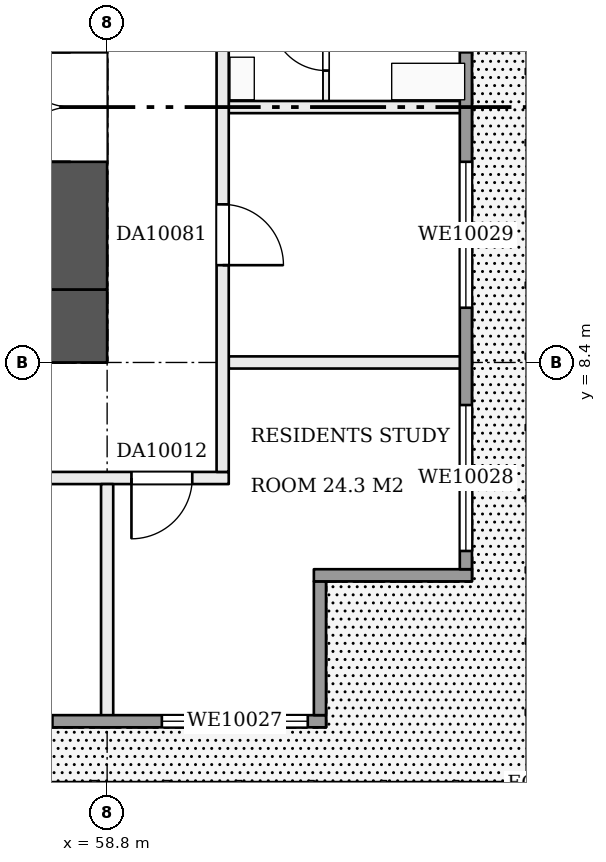
"""IFC4 building model, lengths in metres.
Left out: names, types, materials, properties, quantities, classifications, styles, units other than length and angle.
Written with IfcOpenShell. Run it as: python <this file> out.ifc"""

import sys

from ifc_helpers import new_model, si_unit, direction, frame, frame_2d, origin, place, context, subcontext, project, spatial, rectangle, extrude, element, fill, save


model = new_model("IFC4")
c1 = context("Model", 3, precision=1e-05, world=origin(), true_north=direction((0.0, 1.0)))
c2 = subcontext(c1, "Body", "Model", "MODEL_VIEW")
j1 = project(units=[si_unit("LENGTHUNIT", "METRE"), si_unit("PLANEANGLEUNIT", "RADIAN")], contexts=[c1])
p1 = place(None, origin())
s1 = spatial("IfcSite", under=j1, at=p1, CompositionType="ELEMENT")
p2 = place(p1, origin())
s2 = spatial("IfcBuilding", under=s1, at=p2, CompositionType="ELEMENT")
p3 = place(p2, frame((0.0, 0.0, 46.2)))
s3 = spatial("IfcBuildingStorey", under=s2, at=p3, CompositionType="ELEMENT", Elevation=46.2)
p4 = place(p3, frame((42.0, 9.0, 0.0), z_axis=(0.0, 0.0, 1.0), x_axis=(1.0, 0.0, 0.0)))
e1 = element("IfcWall", 1, at=p4, inside=s3, PredefinedType="SHEAR", context=c2, shape_type="SweptSolid", body=[
    extrude(rectangle(XDim=16.8, YDim=1.2, at=frame_2d((8.4, 0.0))), origin(), (0.0, 0.0, 1.0), 3.22),
])
p5 = place(p4, frame((3.1, 0.0, 0.0)))
e2 = element("IfcOpeningElement", 2, at=p5, cuts=e1, PredefinedType="OPENING", context=c2, shape_type="SweptSolid", body=[
    extrude(rectangle(XDim=1.0, YDim=2.1, at=frame_2d((0.5, 1.05))), frame((0.0, 0.61, 0.0), z_axis=(0.0, -1.0, 0.0), x_axis=(1.0, 0.0, 0.0)), (0.0, 0.0, 1.0), 1.22),
])
p6 = place(p4, frame((12.7, 0.0, 0.0)))
e3 = element("IfcOpeningElement", 3, at=p6, cuts=e1, PredefinedType="OPENING", context=c2, shape_type="SweptSolid", body=[
    extrude(rectangle(XDim=1.0, YDim=2.1, at=frame_2d((0.5, 1.05))), frame((0.0, 0.61, 0.0), z_axis=(0.0, -1.0, 0.0), x_axis=(1.0, 0.0, 0.0)), (0.0, 0.0, 1.0), 1.22),
])
p7 = place(p3, frame((58.2, 9.6, 0.0), z_axis=(0.0, 0.0, 1.0), x_axis=(0.0, 1.0, 0.0)))
e4 = element("IfcWall", 4, at=p7, inside=s3, PredefinedType="SHEAR", context=c2, shape_type="SweptSolid", body=[
    extrude(rectangle(XDim=14.4, YDim=1.2, at=frame_2d((7.2, 0.0))), origin(), (0.0, 0.0, 1.0), 3.22),
])
p8 = place(p7, frame((2.1, 0.0, 0.0)))
e5 = element("IfcOpeningElement", 5, at=p8, cuts=e4, PredefinedType="OPENING", context=c2, shape_type="SweptSolid", body=[
    extrude(rectangle(XDim=1.8, YDim=2.1, at=frame_2d((0.9, 1.05))), frame((0.0, 0.61, 0.0), z_axis=(0.0, -1.0, 0.0), x_axis=(1.0, 0.0, 0.0)), (0.0, 0.0, 1.0), 1.22),
])
p9 = place(p3, frame((42.1, 6.5, 0.0), z_axis=(0.0, 0.0, 1.0), x_axis=(1.0, 0.0, 0.0)))
e6 = element("IfcWall", 6, at=p9, inside=s3, PredefinedType="PARTITIONING", context=c2, shape_type="SweptSolid", body=[
    extrude(rectangle(XDim=18.7, YDim=0.2, at=frame_2d((9.35, 0.0))), origin(), (0.0, 0.0, 1.0), 3.22),
])
p10 = place(p9, frame((1.5, 0.0, 0.0)))
e7 = element("IfcOpeningElement", 7, at=p10, cuts=e6, PredefinedType="OPENING", context=c2, shape_type="SweptSolid", body=[
    extrude(rectangle(XDim=1.0, YDim=2.1, at=frame_2d((0.5, 1.05))), frame((0.0, 0.11, 0.0), z_axis=(0.0, -1.0, 0.0), x_axis=(1.0, 0.0, 0.0)), (0.0, 0.0, 1.0), 0.22),
])
p11 = place(p9, frame((6.7, 0.0, 0.0)))
e8 = element("IfcOpeningElement", 8, at=p11, cuts=e6, PredefinedType="OPENING", context=c2, shape_type="SweptSolid", body=[
    extrude(rectangle(XDim=1.0, YDim=2.1, at=frame_2d((0.5, 1.05))), frame((0.0, 0.11, 0.0), z_axis=(0.0, -1.0, 0.0), x_axis=(1.0, 0.0, 0.0)), (0.0, 0.0, 1.0), 0.22),
])
p12 = place(p9, frame((14.1, 0.0, 0.0)))
e9 = element("IfcOpeningElement", 9, at=p12, cuts=e6, PredefinedType="OPENING", context=c2, shape_type="SweptSolid", body=[
    extrude(rectangle(XDim=1.0, YDim=2.1, at=frame_2d((0.5, 1.05))), frame((0.0, 0.11, 0.0), z_axis=(0.0, -1.0, 0.0), x_axis=(1.0, 0.0, 0.0)), (0.0, 0.0, 1.0), 0.22),
])
p13 = place(p9, frame((17.1, 0.0, 0.0)))
e10 = element("IfcOpeningElement", 10, at=p13, cuts=e6, PredefinedType="OPENING", context=c2, shape_type="SweptSolid", body=[
    extrude(rectangle(XDim=1.0, YDim=2.1, at=frame_2d((0.5, 1.05))), frame((0.0, 0.11, 0.0), z_axis=(0.0, -1.0, 0.0), x_axis=(1.0, 0.0, 0.0)), (0.0, 0.0, 1.0), 0.22),
])
for number, where, z_axis, x_axis in (
    (11, (60.8, 8.4, 0.0), (0.0, 0.0, 1.0), (1.0, 0.0, 0.0)),
    (12, (60.8, 12.6, 0.0), (0.0, 0.0, 1.0), (1.0, 0.0, 0.0)),
    (13, (58.8, 2.5, 0.0), (0.0, 0.0, 1.0), (0.0, 1.0, 0.0)),
):
    element("IfcWall", number, at=place(p3, frame(where, z_axis=z_axis, x_axis=x_axis)), inside=s3, PredefinedType="PARTITIONING", context=c2, shape_type="SweptSolid", body=[
        extrude(rectangle(XDim=3.9, YDim=0.2, at=frame_2d((1.95, 0.0))), origin(), (0.0, 0.0, 1.0), 3.22),
    ])
p14 = place(p3, frame((60.7, 6.6, 0.0), z_axis=(0.0, 0.0, 1.0), x_axis=(0.0, 1.0, 0.0)))
e14 = element("IfcWall", 14, at=p14, inside=s3, PredefinedType="PARTITIONING", context=c2, shape_type="SweptSolid", body=[
    extrude(rectangle(XDim=14.6, YDim=0.2, at=frame_2d((7.3, 0.0))), origin(), (0.0, 0.0, 1.0), 3.22),
])
p15 = place(p14, frame((3.4, 0.0, 0.0)))
e15 = element("IfcOpeningElement", 15, at=p15, cuts=e14, PredefinedType="OPENING", context=c2, shape_type="SweptSolid", body=[
    extrude(rectangle(XDim=1.0, YDim=2.1, at=frame_2d((0.5, 1.05))), frame((0.0, 0.11, 0.0), z_axis=(0.0, -1.0, 0.0), x_axis=(1.0, 0.0, 0.0)), (0.0, 0.0, 1.0), 0.22),
])
p16 = place(p14, frame((8.7, 0.0, 0.0)))
e16 = element("IfcOpeningElement", 16, at=p16, cuts=e14, PredefinedType="OPENING", context=c2, shape_type="SweptSolid", body=[
    extrude(rectangle(XDim=1.0, YDim=2.1, at=frame_2d((0.5, 1.05))), frame((0.0, 0.11, 0.0), z_axis=(0.0, -1.0, 0.0), x_axis=(1.0, 0.0, 0.0)), (0.0, 0.0, 1.0), 0.22),
])
p17 = place(p3, frame((62.4, 12.7, 0.0), z_axis=(0.0, 0.0, 1.0), x_axis=(0.0, 1.0, 0.0)))
e17 = element("IfcWall", 17, at=p17, inside=s3, PredefinedType="PARTITIONING", context=c2, shape_type="SweptSolid", body=[
    extrude(rectangle(XDim=4.05, YDim=0.1, at=frame_2d((2.025, 0.0))), origin(), (0.0, 0.0, 1.0), 3.22),
])
p18 = place(p17, frame((2.6, 0.0, 0.0)))
e18 = element("IfcOpeningElement", 18, at=p18, cuts=e17, PredefinedType="OPENING", context=c2, shape_type="SweptSolid", body=[
    extrude(rectangle(XDim=0.9, YDim=2.1, at=frame_2d((0.45, 1.05))), frame((0.0, 0.06, 0.0), z_axis=(0.0, -1.0, 0.0), x_axis=(1.0, 0.0, 0.0)), (0.0, 0.0, 1.0), 0.12),
])
p19 = place(p17, frame((0.5, 0.0, 0.0)))
e19 = element("IfcOpeningElement", 19, at=p19, cuts=e17, PredefinedType="OPENING", context=c2, shape_type="SweptSolid", body=[
    extrude(rectangle(XDim=0.9, YDim=2.1, at=frame_2d((0.45, 1.05))), frame((0.0, 0.06, 0.0), z_axis=(0.0, -1.0, 0.0), x_axis=(1.0, 0.0, 0.0)), (0.0, 0.0, 1.0), 0.12),
])
p20 = place(p3, frame((4.8, 2.5, 0.0), z_axis=(0.0, 0.0, 1.0), x_axis=(1.0, 0.0, 0.0)))
e20 = element("IfcWall", 20, at=p20, inside=s3, PredefinedType="SOLIDWALL", context=c2, shape_type="SweptSolid", body=[
    extrude(rectangle(XDim=57.6, YDim=0.2, at=frame_2d((28.8, 0.0))), origin(), (0.0, 0.0, 1.0), 3.22),
])
p21 = place(p20, frame((0.3, 0.0, 0.0)))
e21 = element("IfcOpeningElement", 21, at=p21, cuts=e20, PredefinedType="OPENING", context=c2, shape_type="SweptSolid", body=[
    extrude(rectangle(XDim=2.4, YDim=2.2, at=frame_2d((1.2, 1.1))), frame((0.0, 0.11, 0.0), z_axis=(0.0, -1.0, 0.0), x_axis=(1.0, 0.0, 0.0)), (0.0, 0.0, 1.0), 0.22),
])
p22 = place(p20, frame((4.5, 0.0, 0.9)))
e22 = element("IfcOpeningElement", 22, at=p22, cuts=e20, PredefinedType="OPENING", context=c2, shape_type="SweptSolid", body=[
    extrude(rectangle(XDim=2.4, YDim=1.5, at=frame_2d((1.2, 0.75))), frame((0.0, 0.11, 0.0), z_axis=(0.0, -1.0, 0.0), x_axis=(1.0, 0.0, 0.0)), (0.0, 0.0, 1.0), 0.22),
])
p23 = place(p20, frame((8.7, 0.0, 0.9)))
e23 = element("IfcOpeningElement", 23, at=p23, cuts=e20, PredefinedType="OPENING", context=c2, shape_type="SweptSolid", body=[
    extrude(rectangle(XDim=2.4, YDim=1.5, at=frame_2d((1.2, 0.75))), frame((0.0, 0.11, 0.0), z_axis=(0.0, -1.0, 0.0), x_axis=(1.0, 0.0, 0.0)), (0.0, 0.0, 1.0), 0.22),
])
p24 = place(p20, frame((12.9, 0.0, 0.0)))
e24 = element("IfcOpeningElement", 24, at=p24, cuts=e20, PredefinedType="OPENING", context=c2, shape_type="SweptSolid", body=[
    extrude(rectangle(XDim=2.4, YDim=2.2, at=frame_2d((1.2, 1.1))), frame((0.0, 0.11, 0.0), z_axis=(0.0, -1.0, 0.0), x_axis=(1.0, 0.0, 0.0)), (0.0, 0.0, 1.0), 0.22),
])
p25 = place(p20, frame((17.1, 0.0, 0.9)))
e25 = element("IfcOpeningElement", 25, at=p25, cuts=e20, PredefinedType="OPENING", context=c2, shape_type="SweptSolid", body=[
    extrude(rectangle(XDim=2.4, YDim=1.5, at=frame_2d((1.2, 0.75))), frame((0.0, 0.11, 0.0), z_axis=(0.0, -1.0, 0.0), x_axis=(1.0, 0.0, 0.0)), (0.0, 0.0, 1.0), 0.22),
])
p26 = place(p20, frame((21.3, 0.0, 0.9)))
e26 = element("IfcOpeningElement", 26, at=p26, cuts=e20, PredefinedType="OPENING", context=c2, shape_type="SweptSolid", body=[
    extrude(rectangle(XDim=2.4, YDim=1.5, at=frame_2d((1.2, 0.75))), frame((0.0, 0.11, 0.0), z_axis=(0.0, -1.0, 0.0), x_axis=(1.0, 0.0, 0.0)), (0.0, 0.0, 1.0), 0.22),
])
p27 = place(p20, frame((25.5, 0.0, 0.0)))
e27 = element("IfcOpeningElement", 27, at=p27, cuts=e20, PredefinedType="OPENING", context=c2, shape_type="SweptSolid", body=[
    extrude(rectangle(XDim=2.4, YDim=2.2, at=frame_2d((1.2, 1.1))), frame((0.0, 0.11, 0.0), z_axis=(0.0, -1.0, 0.0), x_axis=(1.0, 0.0, 0.0)), (0.0, 0.0, 1.0), 0.22),
])
p28 = place(p20, frame((29.7, 0.0, 0.0)))
e28 = element("IfcOpeningElement", 28, at=p28, cuts=e20, PredefinedType="OPENING", context=c2, shape_type="SweptSolid", body=[
    extrude(rectangle(XDim=2.4, YDim=2.2, at=frame_2d((1.2, 1.1))), frame((0.0, 0.11, 0.0), z_axis=(0.0, -1.0, 0.0), x_axis=(1.0, 0.0, 0.0)), (0.0, 0.0, 1.0), 0.22),
])
p29 = place(p20, frame((33.9, 0.0, 0.0)))
e29 = element("IfcOpeningElement", 29, at=p29, cuts=e20, PredefinedType="OPENING", context=c2, shape_type="SweptSolid", body=[
    extrude(rectangle(XDim=2.4, YDim=2.2, at=frame_2d((1.2, 1.1))), frame((0.0, 0.11, 0.0), z_axis=(0.0, -1.0, 0.0), x_axis=(1.0, 0.0, 0.0)), (0.0, 0.0, 1.0), 0.22),
])
p30 = place(p20, frame((38.1, 0.0, 0.9)))
e30 = element("IfcOpeningElement", 30, at=p30, cuts=e20, PredefinedType="OPENING", context=c2, shape_type="SweptSolid", body=[
    extrude(rectangle(XDim=2.4, YDim=1.5, at=frame_2d((1.2, 0.75))), frame((0.0, 0.11, 0.0), z_axis=(0.0, -1.0, 0.0), x_axis=(1.0, 0.0, 0.0)), (0.0, 0.0, 1.0), 0.22),
])
p31 = place(p20, frame((42.3, 0.0, 0.9)))
e31 = element("IfcOpeningElement", 31, at=p31, cuts=e20, PredefinedType="OPENING", context=c2, shape_type="SweptSolid", body=[
    extrude(rectangle(XDim=2.4, YDim=1.5, at=frame_2d((1.2, 0.75))), frame((0.0, 0.11, 0.0), z_axis=(0.0, -1.0, 0.0), x_axis=(1.0, 0.0, 0.0)), (0.0, 0.0, 1.0), 0.22),
])
p32 = place(p20, frame((46.5, 0.0, 0.0)))
e32 = element("IfcOpeningElement", 32, at=p32, cuts=e20, PredefinedType="OPENING", context=c2, shape_type="SweptSolid", body=[
    extrude(rectangle(XDim=2.4, YDim=2.2, at=frame_2d((1.2, 1.1))), frame((0.0, 0.11, 0.0), z_axis=(0.0, -1.0, 0.0), x_axis=(1.0, 0.0, 0.0)), (0.0, 0.0, 1.0), 0.22),
])
p33 = place(p20, frame((50.7, 0.0, 0.9)))
e33 = element("IfcOpeningElement", 33, at=p33, cuts=e20, PredefinedType="OPENING", context=c2, shape_type="SweptSolid", body=[
    extrude(rectangle(XDim=2.4, YDim=1.5, at=frame_2d((1.2, 0.75))), frame((0.0, 0.11, 0.0), z_axis=(0.0, -1.0, 0.0), x_axis=(1.0, 0.0, 0.0)), (0.0, 0.0, 1.0), 0.22),
])
p34 = place(p20, frame((54.9, 0.0, 0.9)))
e34 = element("IfcOpeningElement", 34, at=p34, cuts=e20, PredefinedType="OPENING", context=c2, shape_type="SweptSolid", body=[
    extrude(rectangle(XDim=2.4, YDim=1.5, at=frame_2d((1.2, 0.75))), frame((0.0, 0.11, 0.0), z_axis=(0.0, -1.0, 0.0), x_axis=(1.0, 0.0, 0.0)), (0.0, 0.0, 1.0), 0.22),
])
p35 = place(p3, frame((62.3, 2.6, 0.0), z_axis=(0.0, 0.0, 1.0), x_axis=(0.0, 1.0, 0.0)))
e35 = element("IfcWall", 35, at=p35, inside=s3, PredefinedType="SOLIDWALL", context=c2, shape_type="SweptSolid", body=[
    extrude(rectangle(XDim=2.2, YDim=0.2, at=frame_2d((1.1, 0.0))), origin(), (0.0, 0.0, 1.0), 3.22),
])
p36 = place(p3, frame((62.2, 4.9, 0.0), z_axis=(0.0, 0.0, 1.0), x_axis=(1.0, 0.0, 0.0)))
e36 = element("IfcWall", 36, at=p36, inside=s3, PredefinedType="SOLIDWALL", context=c2, shape_type="SweptSolid", body=[
    extrude(rectangle(XDim=2.6, YDim=0.2, at=frame_2d((1.3, 0.0))), origin(), (0.0, 0.0, 1.0), 3.22),
])
p37 = place(p3, frame((64.7, 5.0, 0.0), z_axis=(0.0, 0.0, 1.0), x_axis=(0.0, 1.0, 0.0)))
e37 = element("IfcWall", 37, at=p37, inside=s3, PredefinedType="SOLIDWALL", context=c2, shape_type="SweptSolid", body=[
    extrude(rectangle(XDim=15.2, YDim=0.2, at=frame_2d((7.6, 0.0))), origin(), (0.0, 0.0, 1.0), 3.22),
])
p38 = place(p37, frame((0.3, 0.0, 0.9)))
e38 = element("IfcOpeningElement", 38, at=p38, cuts=e37, PredefinedType="OPENING", context=c2, shape_type="SweptSolid", body=[
    extrude(rectangle(XDim=2.4, YDim=1.5, at=frame_2d((1.2, 0.75))), frame((0.0, 0.11, 0.0), z_axis=(0.0, -1.0, 0.0), x_axis=(1.0, 0.0, 0.0)), (0.0, 0.0, 1.0), 0.22),
])
p39 = place(p37, frame((4.3, 0.0, 0.9)))
e39 = element("IfcOpeningElement", 39, at=p39, cuts=e37, PredefinedType="OPENING", context=c2, shape_type="SweptSolid", body=[
    extrude(rectangle(XDim=2.4, YDim=1.5, at=frame_2d((1.2, 0.75))), frame((0.0, 0.11, 0.0), z_axis=(0.0, -1.0, 0.0), x_axis=(1.0, 0.0, 0.0)), (0.0, 0.0, 1.0), 0.22),
])
p40 = place(p37, frame((8.5, 0.0, 0.9)))
e40 = element("IfcOpeningElement", 40, at=p40, cuts=e37, PredefinedType="OPENING", context=c2, shape_type="SweptSolid", body=[
    extrude(rectangle(XDim=2.4, YDim=1.5, at=frame_2d((1.2, 0.75))), frame((0.0, 0.11, 0.0), z_axis=(0.0, -1.0, 0.0), x_axis=(1.0, 0.0, 0.0)), (0.0, 0.0, 1.0), 0.22),
])
p41 = place(p37, frame((12.5, 0.0, 0.0)))
e41 = element("IfcOpeningElement", 41, at=p41, cuts=e37, PredefinedType="OPENING", context=c2, shape_type="SweptSolid", body=[
    extrude(rectangle(XDim=2.4, YDim=2.2, at=frame_2d((1.2, 1.1))), frame((0.0, 0.11, 0.0), z_axis=(0.0, -1.0, 0.0), x_axis=(1.0, 0.0, 0.0)), (0.0, 0.0, 1.0), 0.22),
])
p42 = place(p8, origin())
e42 = element("IfcDoor", 42, at=p42, inside=s3, OperationType="DOUBLE_DOOR_SINGLE_SWING", PredefinedType="DOOR", context=c2, shape_type="SweptSolid", body=[
    extrude(rectangle(XDim=1.8, YDim=2.1, at=frame_2d((0.9, 1.05))), frame((0.0, 0.025, 0.0), z_axis=(0.0, -1.0, 0.0), x_axis=(1.0, 0.0, 0.0)), (0.0, 0.0, 1.0), 0.05),
])
fill(e5, e42)
p43 = place(p13, frame((1.0, 0.0, 0.0), z_axis=(0.0, 0.0, 1.0), x_axis=(-1.0, 0.0, 0.0)))
e43 = element("IfcDoor", 43, at=p43, inside=s3, OperationType="SINGLE_SWING_RIGHT", PredefinedType="DOOR", context=c2, shape_type="SweptSolid", body=[
    extrude(rectangle(XDim=1.0, YDim=2.1, at=frame_2d((0.5, 1.05))), frame((0.0, 0.025, 0.0), z_axis=(0.0, -1.0, 0.0), x_axis=(1.0, 0.0, 0.0)), (0.0, 0.0, 1.0), 0.05),
])
fill(e10, e43)
p44 = place(p15, frame((1.0, 0.0, 0.0), z_axis=(0.0, 0.0, 1.0), x_axis=(-1.0, 0.0, 0.0)))
e44 = element("IfcDoor", 44, at=p44, inside=s3, OperationType="SINGLE_SWING_RIGHT", PredefinedType="DOOR", context=c2, shape_type="SweptSolid", body=[
    extrude(rectangle(XDim=1.0, YDim=2.1, at=frame_2d((0.5, 1.05))), frame((0.0, 0.025, 0.0), z_axis=(0.0, -1.0, 0.0), x_axis=(1.0, 0.0, 0.0)), (0.0, 0.0, 1.0), 0.05),
])
fill(e15, e44)
p45 = place(p19, origin())
e45 = element("IfcDoor", 45, at=p45, inside=s3, OperationType="SINGLE_SWING_RIGHT", PredefinedType="DOOR", context=c2, shape_type="SweptSolid", body=[
    extrude(rectangle(XDim=0.9, YDim=2.1, at=frame_2d((0.45, 1.05))), frame((0.0, 0.025, 0.0), z_axis=(0.0, -1.0, 0.0), x_axis=(1.0, 0.0, 0.0)), (0.0, 0.0, 1.0), 0.05),
])
fill(e19, e45)
p46 = place(p34, origin())
e46 = element("IfcWindow", 46, at=p46, inside=s3, PartitioningType="SINGLE_PANEL", PredefinedType="WINDOW", context=c2, shape_type="SweptSolid", body=[
    extrude(rectangle(XDim=2.4, YDim=1.5, at=frame_2d((1.2, 0.75))), frame((0.0, 0.03, 0.0), z_axis=(0.0, -1.0, 0.0), x_axis=(1.0, 0.0, 0.0)), (0.0, 0.0, 1.0), 0.06),
])
fill(e34, e46)
p47 = place(p38, origin())
e47 = element("IfcWindow", 47, at=p47, inside=s3, PartitioningType="SINGLE_PANEL", PredefinedType="WINDOW", context=c2, shape_type="SweptSolid", body=[
    extrude(rectangle(XDim=2.4, YDim=1.5, at=frame_2d((1.2, 0.75))), frame((0.0, 0.03, 0.0), z_axis=(0.0, -1.0, 0.0), x_axis=(1.0, 0.0, 0.0)), (0.0, 0.0, 1.0), 0.06),
])
fill(e38, e47)
p48 = place(p39, origin())
e48 = element("IfcWindow", 48, at=p48, inside=s3, PartitioningType="SINGLE_PANEL", PredefinedType="WINDOW", context=c2, shape_type="SweptSolid", body=[
    extrude(rectangle(XDim=2.4, YDim=1.5, at=frame_2d((1.2, 0.75))), frame((0.0, 0.03, 0.0), z_axis=(0.0, -1.0, 0.0), x_axis=(1.0, 0.0, 0.0)), (0.0, 0.0, 1.0), 0.06),
])
fill(e39, e48)
save(model, sys.argv[1])
